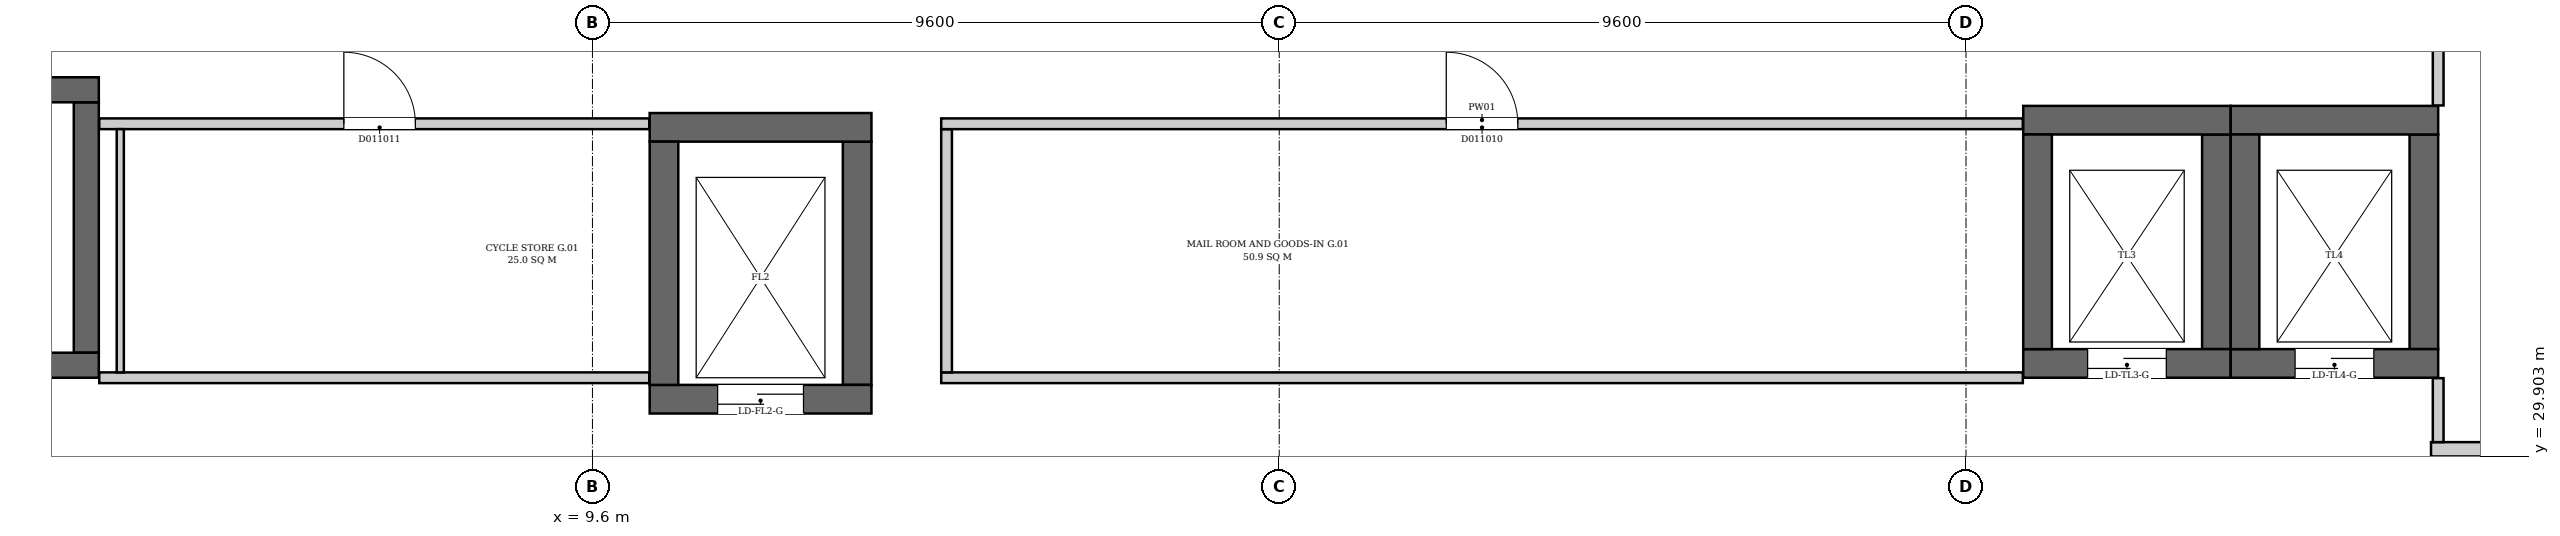
"""IFC4 building model, lengths in metres.
Left out: names, types, materials, properties, quantities, classifications, styles, units other than length and angle.
Written with IfcOpenShell. Run it as: python <this file> out.ifc"""

import sys

from ifc_helpers import new_model, si_unit, direction, frame, frame_2d, origin, place, context, subcontext, project, spatial, rectangle, extrude, element, fill, save


model = new_model("IFC4")
c1 = context("Model", 3, precision=1e-05, world=origin(), true_north=direction((0.0, 1.0)))
c2 = subcontext(c1, "Body", "Model", "MODEL_VIEW")
j1 = project(units=[si_unit("LENGTHUNIT", "METRE"), si_unit("PLANEANGLEUNIT", "RADIAN")], contexts=[c1])
p1 = place(None, origin())
s1 = spatial("IfcSite", under=j1, at=p1, CompositionType="ELEMENT")
p2 = place(p1, origin())
s2 = spatial("IfcBuilding", under=s1, at=p2, CompositionType="ELEMENT")
p3 = place(p2, origin())
s3 = spatial("IfcBuildingStorey", under=s2, at=p3, CompositionType="ELEMENT", Elevation=0.0)
for number, where, z_axis, x_axis in (
    (1, (0.2, 31.175, 0.0), (0.0, 0.0, 1.0), (1.0, 0.0, 0.0)),
    (2, (0.2, 35.025, 0.0), (0.0, 0.0, 1.0), (1.0, 0.0, 0.0)),
):
    element("IfcWall", number, at=place(p3, frame(where, z_axis=z_axis, x_axis=x_axis)), inside=s3, PredefinedType="SHEAR", context=c2, shape_type="SweptSolid", body=[
        extrude(rectangle(XDim=2.5, YDim=0.35, at=frame_2d((1.25, 0.0))), origin(), (0.0, 0.0, 1.0), 6.5),
    ])
p4 = place(p3, frame((2.525, 31.35, 0.0), z_axis=(0.0, 0.0, 1.0), x_axis=(0.0, 1.0, 0.0)))
e3 = element("IfcWall", 3, at=p4, inside=s3, PredefinedType="SHEAR", context=c2, shape_type="SweptSolid", body=[
    extrude(rectangle(XDim=3.5, YDim=0.35, at=frame_2d((1.75, 0.0))), origin(), (0.0, 0.0, 1.0), 6.5),
])
p5 = place(p3, frame((10.4, 30.7, 0.0), z_axis=(0.0, 0.0, 1.0), x_axis=(1.0, 0.0, 0.0)))
e4 = element("IfcWall", 4, at=p5, inside=s3, PredefinedType="SHEAR", context=c2, shape_type="SweptSolid", body=[
    extrude(rectangle(XDim=3.1, YDim=0.4, at=frame_2d((1.55, 0.0))), origin(), (0.0, 0.0, 1.0), 6.5),
])
p6 = place(p5, frame((0.95, 0.0, 0.0)))
e5 = element("IfcOpeningElement", 5, at=p6, cuts=e4, PredefinedType="OPENING", context=c2, shape_type="SweptSolid", body=[
    extrude(rectangle(XDim=1.2, YDim=2.1, at=frame_2d((0.6, 1.05))), frame((0.0, 0.21, 0.0), z_axis=(0.0, -1.0, 0.0), x_axis=(1.0, 0.0, 0.0)), (0.0, 0.0, 1.0), 0.42),
])
p7 = place(p3, frame((10.4, 34.5, 0.0), z_axis=(0.0, 0.0, 1.0), x_axis=(1.0, 0.0, 0.0)))
e6 = element("IfcWall", 6, at=p7, inside=s3, PredefinedType="SHEAR", context=c2, shape_type="SweptSolid", body=[
    extrude(rectangle(XDim=3.1, YDim=0.4, at=frame_2d((1.55, 0.0))), origin(), (0.0, 0.0, 1.0), 6.5),
])
for number, where, z_axis, x_axis in (
    (7, (10.6, 30.9, 0.0), (0.0, 0.0, 1.0), (0.0, 1.0, 0.0)),
    (8, (13.3, 30.9, 0.0), (0.0, 0.0, 1.0), (0.0, 1.0, 0.0)),
):
    element("IfcWall", number, at=place(p3, frame(where, z_axis=z_axis, x_axis=x_axis)), inside=s3, PredefinedType="SHEAR", context=c2, shape_type="SweptSolid", body=[
        extrude(rectangle(XDim=3.4, YDim=0.4, at=frame_2d((1.7, 0.0))), origin(), (0.0, 0.0, 1.0), 6.5),
    ])
p8 = place(p3, frame((29.6, 31.2, 0.0), z_axis=(0.0, 0.0, 1.0), x_axis=(1.0, 0.0, 0.0)))
e9 = element("IfcWall", 9, at=p8, inside=s3, PredefinedType="SHEAR", context=c2, shape_type="SweptSolid", body=[
    extrude(rectangle(XDim=2.9, YDim=0.4, at=frame_2d((1.45, 0.0))), origin(), (0.0, 0.0, 1.0), 6.5),
])
p9 = place(p8, frame((0.9, 0.0, 0.0)))
e10 = element("IfcOpeningElement", 10, at=p9, cuts=e9, PredefinedType="OPENING", context=c2, shape_type="SweptSolid", body=[
    extrude(rectangle(XDim=1.1, YDim=2.1, at=frame_2d((0.55, 1.05))), frame((0.0, 0.21, 0.0), z_axis=(0.0, -1.0, 0.0), x_axis=(1.0, 0.0, 0.0)), (0.0, 0.0, 1.0), 0.42),
])
p10 = place(p3, frame((29.6, 34.6, 0.0), z_axis=(0.0, 0.0, 1.0), x_axis=(1.0, 0.0, 0.0)))
e11 = element("IfcWall", 11, at=p10, inside=s3, PredefinedType="SHEAR", context=c2, shape_type="SweptSolid", body=[
    extrude(rectangle(XDim=2.9, YDim=0.4, at=frame_2d((1.45, 0.0))), origin(), (0.0, 0.0, 1.0), 6.5),
])
for number, where, z_axis, x_axis in (
    (12, (29.8, 31.4, 0.0), (0.0, 0.0, 1.0), (0.0, 1.0, 0.0)),
    (13, (32.3, 31.4, 0.0), (0.0, 0.0, 1.0), (0.0, 1.0, 0.0)),
):
    element("IfcWall", number, at=place(p3, frame(where, z_axis=z_axis, x_axis=x_axis)), inside=s3, PredefinedType="SHEAR", context=c2, shape_type="SweptSolid", body=[
        extrude(rectangle(XDim=3.0, YDim=0.4, at=frame_2d((1.5, 0.0))), origin(), (0.0, 0.0, 1.0), 6.5),
    ])
p11 = place(p3, frame((32.5, 31.2, 0.0), z_axis=(0.0, 0.0, 1.0), x_axis=(1.0, 0.0, 0.0)))
e14 = element("IfcWall", 14, at=p11, inside=s3, PredefinedType="SHEAR", context=c2, shape_type="SweptSolid", body=[
    extrude(rectangle(XDim=2.9, YDim=0.4, at=frame_2d((1.45, 0.0))), origin(), (0.0, 0.0, 1.0), 6.5),
])
p12 = place(p11, frame((0.9, 0.0, 0.0)))
e15 = element("IfcOpeningElement", 15, at=p12, cuts=e14, PredefinedType="OPENING", context=c2, shape_type="SweptSolid", body=[
    extrude(rectangle(XDim=1.1, YDim=2.1, at=frame_2d((0.55, 1.05))), frame((0.0, 0.21, 0.0), z_axis=(0.0, -1.0, 0.0), x_axis=(1.0, 0.0, 0.0)), (0.0, 0.0, 1.0), 0.42),
])
p13 = place(p3, frame((32.5, 34.6, 0.0), z_axis=(0.0, 0.0, 1.0), x_axis=(1.0, 0.0, 0.0)))
e16 = element("IfcWall", 16, at=p13, inside=s3, PredefinedType="SHEAR", context=c2, shape_type="SweptSolid", body=[
    extrude(rectangle(XDim=2.9, YDim=0.4, at=frame_2d((1.45, 0.0))), origin(), (0.0, 0.0, 1.0), 6.5),
])
for number, where, z_axis, x_axis in (
    (17, (32.7, 31.4, 0.0), (0.0, 0.0, 1.0), (0.0, 1.0, 0.0)),
    (18, (35.2, 31.4, 0.0), (0.0, 0.0, 1.0), (0.0, 1.0, 0.0)),
):
    element("IfcWall", number, at=place(p3, frame(where, z_axis=z_axis, x_axis=x_axis)), inside=s3, PredefinedType="SHEAR", context=c2, shape_type="SweptSolid", body=[
        extrude(rectangle(XDim=3.0, YDim=0.4, at=frame_2d((1.5, 0.0))), origin(), (0.0, 0.0, 1.0), 6.5),
    ])
p14 = place(p3, frame((2.706, 31.0, 0.0), z_axis=(0.0, 0.0, 1.0), x_axis=(1.0, 0.0, 0.0)))
e19 = element("IfcWall", 19, at=p14, inside=s3, PredefinedType="PARTITIONING", context=c2, shape_type="SweptSolid", body=[
    extrude(rectangle(XDim=7.688, YDim=0.15, at=frame_2d((3.844, 0.0))), origin(), (0.0, 0.0, 1.0), 6.15),
])
p15 = place(p3, frame((2.706, 34.55, 0.0), z_axis=(0.0, 0.0, 1.0), x_axis=(1.0, 0.0, 0.0)))
e20 = element("IfcWall", 20, at=p15, inside=s3, PredefinedType="PARTITIONING", context=c2, shape_type="SweptSolid", body=[
    extrude(rectangle(XDim=7.688, YDim=0.15, at=frame_2d((3.844, 0.0))), origin(), (0.0, 0.0, 1.0), 6.15),
])
p16 = place(p15, frame((3.419, 0.0, 0.0)))
e21 = element("IfcOpeningElement", 21, at=p16, cuts=e20, PredefinedType="OPENING", context=c2, shape_type="SweptSolid", body=[
    extrude(rectangle(XDim=1.0, YDim=2.1, at=frame_2d((0.5, 1.05))), frame((0.0, 0.085, 0.0), z_axis=(0.0, -1.0, 0.0), x_axis=(1.0, 0.0, 0.0)), (0.0, 0.0, 1.0), 0.17),
])
p17 = place(p3, frame((3.0, 31.075, 0.0), z_axis=(0.0, 0.0, 1.0), x_axis=(0.0, 1.0, 0.0)))
e22 = element("IfcWall", 22, at=p17, inside=s3, PredefinedType="PARTITIONING", context=c2, shape_type="SweptSolid", body=[
    extrude(rectangle(XDim=3.4, YDim=0.1, at=frame_2d((1.7, 0.0))), origin(), (0.0, 0.0, 1.0), 6.15),
])
p18 = place(p3, frame((14.475, 31.0, 0.0), z_axis=(0.0, 0.0, 1.0), x_axis=(1.0, 0.0, 0.0)))
e23 = element("IfcWall", 23, at=p18, inside=s3, PredefinedType="PARTITIONING", context=c2, shape_type="SweptSolid", body=[
    extrude(rectangle(XDim=15.119, YDim=0.15, at=frame_2d((7.56, 0.0))), origin(), (0.0, 0.0, 1.0), 6.15),
])
p19 = place(p3, frame((14.55, 31.075, 0.0), z_axis=(0.0, 0.0, 1.0), x_axis=(0.0, 1.0, 0.0)))
e24 = element("IfcWall", 24, at=p19, inside=s3, PredefinedType="PARTITIONING", context=c2, shape_type="SweptSolid", body=[
    extrude(rectangle(XDim=3.4, YDim=0.15, at=frame_2d((1.7, 0.0))), origin(), (0.0, 0.0, 1.0), 6.15),
])
p20 = place(p3, frame((14.475, 34.55, 0.0), z_axis=(0.0, 0.0, 1.0), x_axis=(1.0, 0.0, 0.0)))
e25 = element("IfcWall", 25, at=p20, inside=s3, PredefinedType="PARTITIONING", context=c2, shape_type="SweptSolid", body=[
    extrude(rectangle(XDim=15.119, YDim=0.15, at=frame_2d((7.56, 0.0))), origin(), (0.0, 0.0, 1.0), 6.15),
])
p21 = place(p20, frame((7.06, 0.0, 0.0)))
e26 = element("IfcOpeningElement", 26, at=p21, cuts=e25, PredefinedType="OPENING", context=c2, shape_type="SweptSolid", body=[
    extrude(rectangle(XDim=1.0, YDim=2.1, at=frame_2d((0.5, 1.05))), frame((0.0, 0.085, 0.0), z_axis=(0.0, -1.0, 0.0), x_axis=(1.0, 0.0, 0.0)), (0.0, 0.0, 1.0), 0.17),
])
p22 = place(p3, frame((35.3, 30.0, 0.0), z_axis=(0.0, 0.0, 1.0), x_axis=(1.0, 0.0, 0.0)))
e27 = element("IfcWall", 27, at=p22, inside=s3, PredefinedType="PARTITIONING", context=c2, shape_type="SweptSolid", body=[
    extrude(rectangle(XDim=22.094, YDim=0.2, at=frame_2d((11.047, 0.0))), origin(), (0.0, 0.0, 1.0), 6.15),
])
p23 = place(p3, frame((35.4, 30.1, 0.0), z_axis=(0.0, 0.0, 1.0), x_axis=(0.0, 1.0, 0.0)))
e28 = element("IfcWall", 28, at=p23, inside=s3, PredefinedType="PARTITIONING", context=c2, shape_type="SweptSolid", body=[
    extrude(rectangle(XDim=0.894, YDim=0.15, at=frame_2d((0.447, 0.0))), origin(), (0.0, 0.0, 1.0), 6.15),
])
p24 = place(p3, frame((35.4, 34.806, 0.0), z_axis=(0.0, 0.0, 1.0), x_axis=(0.0, 1.0, 0.0)))
e29 = element("IfcWall", 29, at=p24, inside=s3, PredefinedType="PARTITIONING", context=c2, shape_type="SweptSolid", body=[
    extrude(rectangle(XDim=1.669, YDim=0.15, at=frame_2d((0.834, 0.0))), origin(), (0.0, 0.0, 1.0), 6.15),
])
p25 = place(p6, origin())
e30 = element("IfcDoor", 30, at=p25, inside=s3, OperationType="DOUBLE_DOOR_SLIDING", PredefinedType="DOOR", context=c2, shape_type="SweptSolid", body=[
    extrude(rectangle(XDim=1.2, YDim=2.1, at=frame_2d((0.6, 1.05))), frame((0.0, 0.025, 0.0), z_axis=(0.0, -1.0, 0.0), x_axis=(1.0, 0.0, 0.0)), (0.0, 0.0, 1.0), 0.05),
])
fill(e5, e30)
p26 = place(p9, origin())
e31 = element("IfcDoor", 31, at=p26, inside=s3, OperationType="DOUBLE_DOOR_SLIDING", PredefinedType="DOOR", context=c2, shape_type="SweptSolid", body=[
    extrude(rectangle(XDim=1.1, YDim=2.1, at=frame_2d((0.55, 1.05))), frame((0.0, 0.025, 0.0), z_axis=(0.0, -1.0, 0.0), x_axis=(1.0, 0.0, 0.0)), (0.0, 0.0, 1.0), 0.05),
])
fill(e10, e31)
p27 = place(p12, origin())
e32 = element("IfcDoor", 32, at=p27, inside=s3, OperationType="DOUBLE_DOOR_SLIDING", PredefinedType="DOOR", context=c2, shape_type="SweptSolid", body=[
    extrude(rectangle(XDim=1.1, YDim=2.1, at=frame_2d((0.55, 1.05))), frame((0.0, 0.025, 0.0), z_axis=(0.0, -1.0, 0.0), x_axis=(1.0, 0.0, 0.0)), (0.0, 0.0, 1.0), 0.05),
])
fill(e15, e32)
p28 = place(p21, origin())
e33 = element("IfcDoor", 33, at=p28, inside=s3, OperationType="SINGLE_SWING_LEFT", PredefinedType="DOOR", context=c2, shape_type="SweptSolid", body=[
    extrude(rectangle(XDim=1.0, YDim=2.1, at=frame_2d((0.5, 1.05))), frame((0.0, 0.025, 0.0), z_axis=(0.0, -1.0, 0.0), x_axis=(1.0, 0.0, 0.0)), (0.0, 0.0, 1.0), 0.05),
])
fill(e26, e33)
p29 = place(p16, origin())
e34 = element("IfcDoor", 34, at=p29, inside=s3, OperationType="SINGLE_SWING_LEFT", PredefinedType="DOOR", context=c2, shape_type="SweptSolid", body=[
    extrude(rectangle(XDim=1.0, YDim=2.1, at=frame_2d((0.5, 1.05))), frame((0.0, 0.025, 0.0), z_axis=(0.0, -1.0, 0.0), x_axis=(1.0, 0.0, 0.0)), (0.0, 0.0, 1.0), 0.05),
])
fill(e21, e34)
save(model, sys.argv[1])
